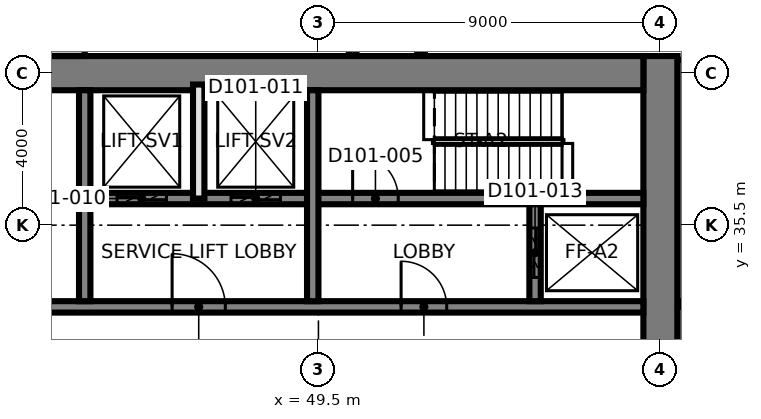
"""IFC4 building model, lengths in metres.
Left out: names, types, materials, properties, quantities, classifications, styles, units other than length and angle.
Written with IfcOpenShell. Run it as: python <this file> out.ifc"""

import sys

from ifc_helpers import new_model, si_unit, direction, frame, frame_2d, origin, place, context, subcontext, project, spatial, rectangle, extrude, element, fill, save


model = new_model("IFC4")
c1 = context("Model", 3, precision=1e-05, world=origin(), true_north=direction((0.0, 1.0)))
c2 = subcontext(c1, "Body", "Model", "MODEL_VIEW")
j1 = project(units=[si_unit("LENGTHUNIT", "METRE"), si_unit("PLANEANGLEUNIT", "RADIAN")], contexts=[c1])
p1 = place(None, origin())
s1 = spatial("IfcSite", under=j1, at=p1, CompositionType="ELEMENT")
p2 = place(p1, origin())
s2 = spatial("IfcBuilding", under=s1, at=p2, CompositionType="ELEMENT")
p3 = place(p2, frame((0.0, 0.0, -4.5)))
s3 = spatial("IfcBuildingStorey", under=s2, at=p3, CompositionType="ELEMENT", Elevation=-4.5)
p4 = place(p3, frame((58.5, 21.05, 0.0), z_axis=(0.0, 0.0, 1.0), x_axis=(0.0, 1.0, 0.0)))
e1 = element("IfcWall", 1, at=p4, inside=s3, PredefinedType="SHEAR", context=c2, shape_type="SweptSolid", body=[
    extrude(rectangle(XDim=18.9, YDim=0.9, at=frame_2d((9.45, 0.0))), origin(), (0.0, 0.0, 1.0), 4.5),
])
p5 = place(p3, frame((31.05, 39.5, 0.0), z_axis=(0.0, 0.0, 1.0), x_axis=(1.0, 0.0, 0.0)))
e2 = element("IfcWall", 2, at=p5, inside=s3, PredefinedType="SHEAR", context=c2, shape_type="SweptSolid", body=[
    extrude(rectangle(XDim=27.0, YDim=0.9, at=frame_2d((13.5, 0.0))), origin(), (0.0, 0.0, 1.0), 4.5),
])
p6 = place(p3, frame((31.95, 33.35, 0.0), z_axis=(0.0, 0.0, 1.0), x_axis=(1.0, 0.0, 0.0)))
e3 = element("IfcWall", 3, at=p6, inside=s3, PredefinedType="SHEAR", context=c2, shape_type="SweptSolid", body=[
    extrude(rectangle(XDim=26.1, YDim=0.3, at=frame_2d((13.05, 0.0))), origin(), (0.0, 0.0, 1.0), 4.5),
])
p7 = place(p6, frame((13.7, 0.0, 0.0)))
e4 = element("IfcOpeningElement", 4, at=p7, cuts=e3, PredefinedType="OPENING", context=c2, shape_type="SweptSolid", body=[
    extrude(rectangle(XDim=1.4, YDim=2.1, at=frame_2d((0.7, 1.05))), frame((0.0, 0.16, 0.0), z_axis=(0.0, -1.0, 0.0), x_axis=(1.0, 0.0, 0.0)), (0.0, 0.0, 1.0), 0.32),
])
p8 = place(p6, frame((5.175, 0.0, 0.0)))
e5 = element("IfcOpeningElement", 5, at=p8, cuts=e3, PredefinedType="OPENING", context=c2, shape_type="SweptSolid", body=[
    extrude(rectangle(XDim=1.2, YDim=2.1, at=frame_2d((0.6, 1.05))), frame((0.0, 0.16, 0.0), z_axis=(0.0, -1.0, 0.0), x_axis=(1.0, 0.0, 0.0)), (0.0, 0.0, 1.0), 0.32),
])
p9 = place(p6, frame((19.725, 0.0, 0.0)))
e6 = element("IfcOpeningElement", 6, at=p9, cuts=e3, PredefinedType="OPENING", context=c2, shape_type="SweptSolid", body=[
    extrude(rectangle(XDim=1.2, YDim=2.1, at=frame_2d((0.6, 1.05))), frame((0.0, 0.16, 0.0), z_axis=(0.0, -1.0, 0.0), x_axis=(1.0, 0.0, 0.0)), (0.0, 0.0, 1.0), 0.32),
])
p10 = place(p3, frame((43.5, 36.2, 0.0), z_axis=(0.0, 0.0, 1.0), x_axis=(1.0, 0.0, 0.0)))
e7 = element("IfcWall", 7, at=p10, inside=s3, PredefinedType="SHEAR", context=c2, shape_type="SweptSolid", body=[
    extrude(rectangle(XDim=14.55, YDim=0.3, at=frame_2d((7.275, 0.0))), origin(), (0.0, 0.0, 1.0), 4.5),
])
p11 = place(p10, frame((6.9, 0.0, 0.0)))
e8 = element("IfcOpeningElement", 8, at=p11, cuts=e7, PredefinedType="OPENING", context=c2, shape_type="SweptSolid", body=[
    extrude(rectangle(XDim=1.2, YDim=2.1, at=frame_2d((0.6, 1.05))), frame((0.0, 0.16, 0.0), z_axis=(0.0, -1.0, 0.0), x_axis=(1.0, 0.0, 0.0)), (0.0, 0.0, 1.0), 0.32),
])
p12 = place(p10, frame((0.7, 0.0, 0.0)))
e9 = element("IfcOpeningElement", 9, at=p12, cuts=e7, PredefinedType="OPENING", context=c2, shape_type="SweptSolid", body=[
    extrude(rectangle(XDim=1.3, YDim=2.4, at=frame_2d((0.65, 1.2))), frame((0.0, 0.16, 0.0), z_axis=(0.0, -1.0, 0.0), x_axis=(1.0, 0.0, 0.0)), (0.0, 0.0, 1.0), 0.32),
])
p13 = place(p10, frame((3.7, 0.0, 0.0)))
e10 = element("IfcOpeningElement", 10, at=p13, cuts=e7, PredefinedType="OPENING", context=c2, shape_type="SweptSolid", body=[
    extrude(rectangle(XDim=1.3, YDim=2.4, at=frame_2d((0.65, 1.2))), frame((0.0, 0.16, 0.0), z_axis=(0.0, -1.0, 0.0), x_axis=(1.0, 0.0, 0.0)), (0.0, 0.0, 1.0), 0.32),
])
for number, where, z_axis, x_axis in (
    (11, (43.35, 33.5, 0.0), (0.0, 0.0, 1.0), (0.0, 1.0, 0.0)),
    (12, (49.35, 33.5, 0.0), (0.0, 0.0, 1.0), (0.0, 1.0, 0.0)),
):
    element("IfcWall", number, at=place(p3, frame(where, z_axis=z_axis, x_axis=x_axis)), inside=s3, PredefinedType="SHEAR", context=c2, shape_type="SweptSolid", body=[
        extrude(rectangle(XDim=5.55, YDim=0.3, at=frame_2d((2.775, 0.0))), origin(), (0.0, 0.0, 1.0), 4.5),
    ])
p14 = place(p3, frame((55.2, 33.5, 0.0), z_axis=(0.0, 0.0, 1.0), x_axis=(0.0, 1.0, 0.0)))
e13 = element("IfcWall", 13, at=p14, inside=s3, PredefinedType="SHEAR", context=c2, shape_type="SweptSolid", body=[
    extrude(rectangle(XDim=2.55, YDim=0.3, at=frame_2d((1.275, 0.0))), origin(), (0.0, 0.0, 1.0), 4.5),
])
p15 = place(p14, frame((0.625, 0.0, 0.0)))
e14 = element("IfcOpeningElement", 14, at=p15, cuts=e13, PredefinedType="OPENING", context=c2, shape_type="SweptSolid", body=[
    extrude(rectangle(XDim=1.3, YDim=2.4, at=frame_2d((0.65, 1.2))), frame((0.0, 0.16, 0.0), z_axis=(0.0, -1.0, 0.0), x_axis=(1.0, 0.0, 0.0)), (0.0, 0.0, 1.0), 0.32),
])
p16 = place(p3, frame((40.65, 40.1, 0.0), z_axis=(0.0, 0.0, 1.0), x_axis=(1.0, 0.0, 0.0)))
e15 = element("IfcWall", 15, at=p16, inside=s3, PredefinedType="PARTITIONING", context=c2, shape_type="SweptSolid", body=[
    extrude(rectangle(XDim=2.7, YDim=0.3, at=frame_2d((1.35, 0.0))), origin(), (0.0, 0.0, 1.0), 4.2),
])
p17 = place(p3, frame((46.35, 36.2, 0.0), z_axis=(0.0, 0.0, 1.0), x_axis=(0.0, 1.0, 0.0)))
e16 = element("IfcWall", 16, at=p17, inside=s3, PredefinedType="SOLIDWALL", context=c2, shape_type="SweptSolid", body=[
    extrude(rectangle(XDim=3.0, YDim=0.3, at=frame_2d((1.5, 0.0))), origin(), (0.0, 0.0, 1.0), 4.2),
])
p18 = place(p3, frame((59.1, 30.65, 0.0), z_axis=(0.0, 0.0, 1.0), x_axis=(0.0, 1.0, 0.0)))
e17 = element("IfcWall", 17, at=p18, inside=s3, PredefinedType="PARTITIONING", context=c2, shape_type="SweptSolid", body=[
    extrude(rectangle(XDim=2.7, YDim=0.3, at=frame_2d((1.35, 0.0))), origin(), (0.0, 0.0, 1.0), 4.2),
])
for number, where, z_axis, x_axis in (
    (18, (50.4, 39.97, 0.0), (0.0, 0.0, 1.0), (0.0, 1.0, 0.0)),
    (19, (52.2, 39.97, 0.0), (0.0, 0.0, 1.0), (0.0, 1.0, 0.0)),
):
    element("IfcWall", number, at=place(p3, frame(where, z_axis=z_axis, x_axis=x_axis)), inside=s3, PredefinedType="PARTITIONING", context=c2, shape_type="SweptSolid", body=[
        extrude(rectangle(XDim=1.96, YDim=0.2, at=frame_2d((0.98, 0.0))), origin(), (0.0, 0.0, 1.0), 4.2),
    ])
p19 = place(p3, frame((59.05, 33.5, 0.0), z_axis=(0.0, 0.0, 1.0), x_axis=(0.0, 1.0, 0.0)))
e20 = element("IfcWall", 20, at=p19, inside=s3, PredefinedType="PARTITIONING", context=c2, shape_type="SweptSolid", body=[
    extrude(rectangle(XDim=6.35, YDim=0.2, at=frame_2d((3.175, 0.0))), origin(), (0.0, 0.0, 1.0), 4.2),
])
p20 = place(p7, origin())
e21 = element("IfcDoor", 21, at=p20, inside=s3, OperationType="SINGLE_SWING_RIGHT", PredefinedType="DOOR", context=c2, shape_type="SweptSolid", body=[
    extrude(rectangle(XDim=1.4, YDim=2.1, at=frame_2d((0.7, 1.05))), frame((0.0, 0.025, 0.0), z_axis=(0.0, -1.0, 0.0), x_axis=(1.0, 0.0, 0.0)), (0.0, 0.0, 1.0), 0.05),
])
fill(e4, e21)
p21 = place(p9, origin())
e22 = element("IfcDoor", 22, at=p21, inside=s3, OperationType="SINGLE_SWING_RIGHT", PredefinedType="DOOR", context=c2, shape_type="SweptSolid", body=[
    extrude(rectangle(XDim=1.2, YDim=2.1, at=frame_2d((0.6, 1.05))), frame((0.0, 0.025, 0.0), z_axis=(0.0, -1.0, 0.0), x_axis=(1.0, 0.0, 0.0)), (0.0, 0.0, 1.0), 0.05),
])
fill(e6, e22)
p22 = place(p11, origin())
e23 = element("IfcDoor", 23, at=p22, inside=s3, OperationType="SINGLE_SWING_LEFT", PredefinedType="DOOR", context=c2, shape_type="SweptSolid", body=[
    extrude(rectangle(XDim=1.2, YDim=2.1, at=frame_2d((0.6, 1.05))), frame((0.0, 0.025, 0.0), z_axis=(0.0, -1.0, 0.0), x_axis=(1.0, 0.0, 0.0)), (0.0, 0.0, 1.0), 0.05),
])
fill(e8, e23)
p23 = place(p12, origin())
e24 = element("IfcDoor", 24, at=p23, inside=s3, OperationType="SLIDING_TO_LEFT", PredefinedType="DOOR", context=c2, shape_type="SweptSolid", body=[
    extrude(rectangle(XDim=1.3, YDim=2.4, at=frame_2d((0.65, 1.2))), frame((0.0, 0.025, 0.0), z_axis=(0.0, -1.0, 0.0), x_axis=(1.0, 0.0, 0.0)), (0.0, 0.0, 1.0), 0.05),
])
fill(e9, e24)
p24 = place(p13, origin())
e25 = element("IfcDoor", 25, at=p24, inside=s3, OperationType="SLIDING_TO_LEFT", PredefinedType="DOOR", context=c2, shape_type="SweptSolid", body=[
    extrude(rectangle(XDim=1.3, YDim=2.4, at=frame_2d((0.65, 1.2))), frame((0.0, 0.025, 0.0), z_axis=(0.0, -1.0, 0.0), x_axis=(1.0, 0.0, 0.0)), (0.0, 0.0, 1.0), 0.05),
])
fill(e10, e25)
p25 = place(p15, origin())
e26 = element("IfcDoor", 26, at=p25, inside=s3, OperationType="SLIDING_TO_LEFT", PredefinedType="DOOR", context=c2, shape_type="SweptSolid", body=[
    extrude(rectangle(XDim=1.3, YDim=2.4, at=frame_2d((0.65, 1.2))), frame((0.0, 0.025, 0.0), z_axis=(0.0, -1.0, 0.0), x_axis=(1.0, 0.0, 0.0)), (0.0, 0.0, 1.0), 0.05),
])
fill(e14, e26)
save(model, sys.argv[1])
